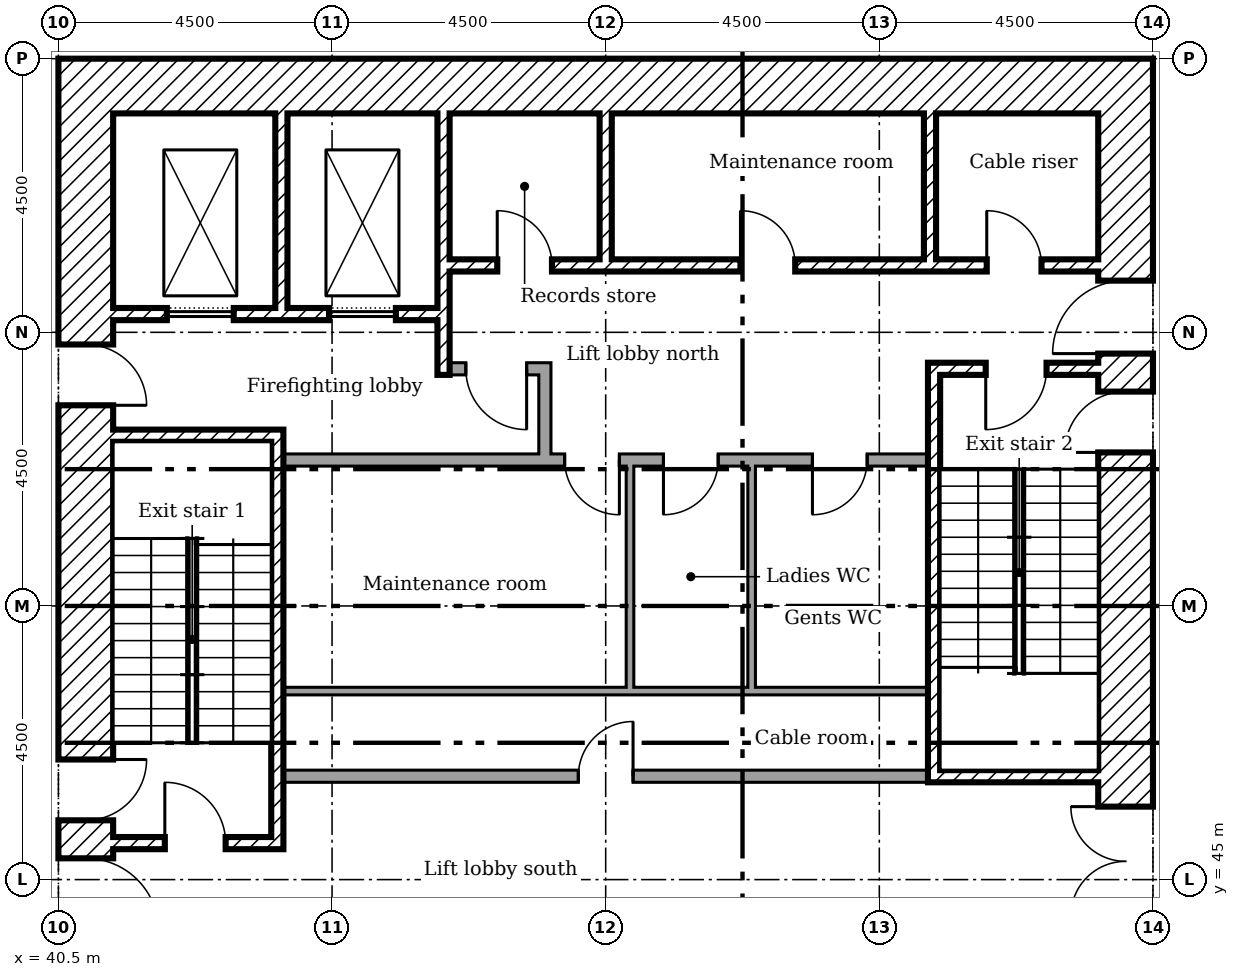
"""IFC4 building model, lengths in metres.
Left out: names, types, materials, properties, quantities, classifications, styles, units other than length and angle.
Written with IfcOpenShell. Run it as: python <this file> out.ifc"""

import sys

from ifc_helpers import new_model, si_unit, direction, frame, frame_2d, origin, place, context, subcontext, project, spatial, rectangle, extrude, element, fill, save


model = new_model("IFC4")
c1 = context("Model", 3, precision=1e-05, world=origin(), true_north=direction((0.0, 1.0)))
c2 = subcontext(c1, "Body", "Model", "MODEL_VIEW")
j1 = project(units=[si_unit("LENGTHUNIT", "METRE"), si_unit("PLANEANGLEUNIT", "RADIAN")], contexts=[c1])
p1 = place(None, origin())
s1 = spatial("IfcSite", under=j1, at=p1, CompositionType="ELEMENT")
p2 = place(p1, origin())
s2 = spatial("IfcBuilding", under=s1, at=p2, CompositionType="ELEMENT")
p3 = place(p2, frame((0.0, 0.0, 34.2)))
s3 = spatial("IfcBuildingStorey", under=s2, at=p3, CompositionType="ELEMENT", Elevation=34.2)
p4 = place(p3, frame((58.05, 40.5, 0.0), z_axis=(0.0, 0.0, 1.0), x_axis=(0.0, 1.0, 0.0)))
e1 = element("IfcWall", 1, at=p4, inside=s3, PredefinedType="SHEAR", context=c2, shape_type="SweptSolid", body=[
    extrude(rectangle(XDim=18.0, YDim=0.9, at=frame_2d((9.0, 0.0))), origin(), (0.0, 0.0, 1.0), 4.125),
])
p5 = place(p4, frame((13.15, 0.0, 0.0)))
e2 = element("IfcOpeningElement", 2, at=p5, cuts=e1, PredefinedType="OPENING", context=c2, shape_type="SweptSolid", body=[
    extrude(rectangle(XDim=1.2, YDim=2.1, at=frame_2d((0.6, 1.05))), frame((0.0, 0.46, 0.0), z_axis=(0.0, -1.0, 0.0), x_axis=(1.0, 0.0, 0.0)), (0.0, 0.0, 1.0), 0.92),
])
p6 = place(p4, frame((3.9, 0.0, 0.0)))
e3 = element("IfcOpeningElement", 3, at=p6, cuts=e1, PredefinedType="OPENING", context=c2, shape_type="SweptSolid", body=[
    extrude(rectangle(XDim=1.8, YDim=2.1, at=frame_2d((0.9, 1.05))), frame((0.0, 0.46, 0.0), z_axis=(0.0, -1.0, 0.0), x_axis=(1.0, 0.0, 0.0)), (0.0, 0.0, 1.0), 0.92),
])
p7 = place(p4, frame((11.525, 0.0, 0.0)))
e4 = element("IfcOpeningElement", 4, at=p7, cuts=e1, PredefinedType="OPENING", context=c2, shape_type="SweptSolid", body=[
    extrude(rectangle(XDim=1.0, YDim=2.1, at=frame_2d((0.5, 1.05))), frame((0.0, 0.46, 0.0), z_axis=(0.0, -1.0, 0.0), x_axis=(1.0, 0.0, 0.0)), (0.0, 0.0, 1.0), 0.92),
])
p8 = place(p3, frame((41.4, 58.05, 0.0)))
e5 = element("IfcWall", 5, at=p8, inside=s3, PredefinedType="SHEAR", context=c2, shape_type="SweptSolid", body=[
    extrude(rectangle(XDim=16.2, YDim=0.9, at=frame_2d((8.1, 0.0))), origin(), (0.0, 0.0, 1.0), 4.125),
])
p9 = place(p3, frame((40.95, 40.5, 0.0), z_axis=(0.0, 0.0, 1.0), x_axis=(0.0, 1.0, 0.0)))
e6 = element("IfcWall", 6, at=p9, inside=s3, PredefinedType="SHEAR", context=c2, shape_type="SweptSolid", body=[
    extrude(rectangle(XDim=18.0, YDim=0.9, at=frame_2d((9.0, 0.0))), origin(), (0.0, 0.0, 1.0), 4.125),
])
p10 = place(p9, frame((3.65, 0.0, 0.0)))
e7 = element("IfcOpeningElement", 7, at=p10, cuts=e6, PredefinedType="OPENING", context=c2, shape_type="SweptSolid", body=[
    extrude(rectangle(XDim=1.2, YDim=2.1, at=frame_2d((0.6, 1.05))), frame((0.0, 0.46, 0.0), z_axis=(0.0, -1.0, 0.0), x_axis=(1.0, 0.0, 0.0)), (0.0, 0.0, 1.0), 0.92),
])
p11 = place(p9, frame((5.475, 0.0, 0.0)))
e8 = element("IfcOpeningElement", 8, at=p11, cuts=e6, PredefinedType="OPENING", context=c2, shape_type="SweptSolid", body=[
    extrude(rectangle(XDim=1.0, YDim=2.1, at=frame_2d((0.5, 1.05))), frame((0.0, 0.46, 0.0), z_axis=(0.0, -1.0, 0.0), x_axis=(1.0, 0.0, 0.0)), (0.0, 0.0, 1.0), 0.92),
])
p12 = place(p9, frame((12.3, 0.0, 0.0)))
e9 = element("IfcOpeningElement", 9, at=p12, cuts=e6, PredefinedType="OPENING", context=c2, shape_type="SweptSolid", body=[
    extrude(rectangle(XDim=1.0, YDim=2.1, at=frame_2d((0.5, 1.05))), frame((0.0, 0.46, 0.0), z_axis=(0.0, -1.0, 0.0), x_axis=(1.0, 0.0, 0.0)), (0.0, 0.0, 1.0), 0.92),
])
p13 = place(p3, frame((44.167, 57.6, 0.0), z_axis=(0.0, 0.0, 1.0), x_axis=(0.0, -1.0, 0.0)))
e10 = element("IfcWall", 10, at=p13, inside=s3, PredefinedType="SHEAR", context=c2, shape_type="SweptSolid", body=[
    extrude(rectangle(XDim=3.2, YDim=0.2, at=frame_2d((1.6, 0.0))), origin(), (0.0, 0.0, 1.0), 4.125),
])
p14 = place(p3, frame((46.833, 57.6, 0.0), z_axis=(0.0, 0.0, 1.0), x_axis=(0.0, -1.0, 0.0)))
e11 = element("IfcWall", 11, at=p14, inside=s3, PredefinedType="SHEAR", context=c2, shape_type="SweptSolid", body=[
    extrude(rectangle(XDim=4.3, YDim=0.2, at=frame_2d((2.15, 0.0))), origin(), (0.0, 0.0, 1.0), 4.125),
])
for number, where, z_axis, x_axis in (
    (12, (49.5, 57.6, 0.0), (0.0, 0.0, 1.0), (0.0, -1.0, 0.0)),
    (13, (54.833, 57.6, 0.0), (0.0, 0.0, 1.0), (0.0, -1.0, 0.0)),
):
    element("IfcWall", number, at=place(p3, frame(where, z_axis=z_axis, x_axis=x_axis)), inside=s3, PredefinedType="SHEAR", context=c2, shape_type="SweptSolid", body=[
        extrude(rectangle(XDim=2.4, YDim=0.2, at=frame_2d((1.2, 0.0))), origin(), (0.0, 0.0, 1.0), 4.125),
    ])
p15 = place(p3, frame((48.5, 51.9, 0.0), z_axis=(0.0, 0.0, 1.0), x_axis=(0.0, 1.0, 0.0)))
e14 = element("IfcWall", 14, at=p15, inside=s3, PredefinedType="PARTITIONING", context=c2, shape_type="SweptSolid", body=[
    extrude(rectangle(XDim=1.6, YDim=0.2, at=frame_2d((0.8, 0.0))), origin(), (0.0, 0.0, 1.0), 4.125),
])
p16 = place(p3, frame((46.933, 53.4, 0.0)))
e15 = element("IfcWall", 15, at=p16, inside=s3, PredefinedType="PARTITIONING", context=c2, shape_type="SweptSolid", body=[
    extrude(rectangle(XDim=1.467, YDim=0.2, at=frame_2d((0.733, 0.0))), origin(), (0.0, 0.0, 1.0), 4.125),
])
p17 = place(p16, frame((0.267, 0.0, 0.0)))
e16 = element("IfcOpeningElement", 16, at=p17, cuts=e15, PredefinedType="OPENING", context=c2, shape_type="SweptSolid", body=[
    extrude(rectangle(XDim=1.0, YDim=2.1, at=frame_2d((0.5, 1.05))), frame((0.0, 0.11, 0.0), z_axis=(0.0, -1.0, 0.0), x_axis=(1.0, 0.0, 0.0)), (0.0, 0.0, 1.0), 0.22),
])
p18 = place(p3, frame((46.933, 55.1, 0.0)))
e17 = element("IfcWall", 17, at=p18, inside=s3, PredefinedType="SHEAR", context=c2, shape_type="SweptSolid", body=[
    extrude(rectangle(XDim=10.667, YDim=0.2, at=frame_2d((5.333, 0.0))), origin(), (0.0, 0.0, 1.0), 4.125),
])
p19 = place(p18, frame((8.833, 0.0, 0.0)))
e18 = element("IfcOpeningElement", 18, at=p19, cuts=e17, PredefinedType="OPENING", context=c2, shape_type="SweptSolid", body=[
    extrude(rectangle(XDim=0.9, YDim=2.1, at=frame_2d((0.45, 1.05))), frame((0.0, 0.11, 0.0), z_axis=(0.0, -1.0, 0.0), x_axis=(1.0, 0.0, 0.0)), (0.0, 0.0, 1.0), 0.22),
])
p20 = place(p18, frame((0.783, 0.0, 0.0)))
e19 = element("IfcOpeningElement", 19, at=p20, cuts=e17, PredefinedType="OPENING", context=c2, shape_type="SweptSolid", body=[
    extrude(rectangle(XDim=0.9, YDim=2.1, at=frame_2d((0.45, 1.05))), frame((0.0, 0.11, 0.0), z_axis=(0.0, -1.0, 0.0), x_axis=(1.0, 0.0, 0.0)), (0.0, 0.0, 1.0), 0.22),
])
p21 = place(p18, frame((4.783, 0.0, 0.0)))
e20 = element("IfcOpeningElement", 20, at=p21, cuts=e17, PredefinedType="OPENING", context=c2, shape_type="SweptSolid", body=[
    extrude(rectangle(XDim=0.9, YDim=2.1, at=frame_2d((0.45, 1.05))), frame((0.0, 0.11, 0.0), z_axis=(0.0, -1.0, 0.0), x_axis=(1.0, 0.0, 0.0)), (0.0, 0.0, 1.0), 0.22),
])
p22 = place(p3, frame((41.4, 54.3, 0.0)))
e21 = element("IfcWall", 21, at=p22, inside=s3, PredefinedType="SHEAR", context=c2, shape_type="SweptSolid", body=[
    extrude(rectangle(XDim=5.333, YDim=0.2, at=frame_2d((2.667, 0.0))), origin(), (0.0, 0.0, 1.0), 4.125),
])
p23 = place(p22, frame((0.883, 0.0, 0.0)))
e22 = element("IfcOpeningElement", 22, at=p23, cuts=e21, PredefinedType="OPENING", context=c2, shape_type="SweptSolid", body=[
    extrude(rectangle(XDim=1.1, YDim=2.1, at=frame_2d((0.55, 1.05))), frame((0.0, 0.11, 0.0), z_axis=(0.0, -1.0, 0.0), x_axis=(1.0, 0.0, 0.0)), (0.0, 0.0, 1.0), 0.22),
])
p24 = place(p22, frame((3.55, 0.0, 0.0)))
e23 = element("IfcOpeningElement", 23, at=p24, cuts=e21, PredefinedType="OPENING", context=c2, shape_type="SweptSolid", body=[
    extrude(rectangle(XDim=1.1, YDim=2.1, at=frame_2d((0.55, 1.05))), frame((0.0, 0.11, 0.0), z_axis=(0.0, -1.0, 0.0), x_axis=(1.0, 0.0, 0.0)), (0.0, 0.0, 1.0), 0.22),
])
p25 = place(p3, frame((44.1, 45.5, 0.0), z_axis=(0.0, 0.0, 1.0), x_axis=(0.0, 1.0, 0.0)))
e24 = element("IfcWall", 24, at=p25, inside=s3, PredefinedType="SHEAR", context=c2, shape_type="SweptSolid", body=[
    extrude(rectangle(XDim=6.9, YDim=0.2, at=frame_2d((3.45, 0.0))), origin(), (0.0, 0.0, 1.0), 4.125),
])
p26 = place(p3, frame((41.4, 52.3, 0.0)))
e25 = element("IfcWall", 25, at=p26, inside=s3, PredefinedType="SHEAR", context=c2, shape_type="SweptSolid", body=[
    extrude(rectangle(XDim=2.6, YDim=0.2, at=frame_2d((1.3, 0.0))), origin(), (0.0, 0.0, 1.0), 4.125),
])
p27 = place(p3, frame((41.4, 45.6, 0.0)))
e26 = element("IfcWall", 26, at=p27, inside=s3, PredefinedType="SHEAR", context=c2, shape_type="SweptSolid", body=[
    extrude(rectangle(XDim=2.6, YDim=0.2, at=frame_2d((1.3, 0.0))), origin(), (0.0, 0.0, 1.0), 4.125),
])
p28 = place(p27, frame((0.85, 0.0, 0.0)))
e27 = element("IfcOpeningElement", 27, at=p28, cuts=e26, PredefinedType="OPENING", context=c2, shape_type="SweptSolid", body=[
    extrude(rectangle(XDim=1.0, YDim=2.1, at=frame_2d((0.5, 1.05))), frame((0.0, 0.11, 0.0), z_axis=(0.0, -1.0, 0.0), x_axis=(1.0, 0.0, 0.0)), (0.0, 0.0, 1.0), 0.22),
])
p29 = place(p3, frame((54.8, 53.4, 0.0)))
e28 = element("IfcWall", 28, at=p29, inside=s3, PredefinedType="SHEAR", context=c2, shape_type="SweptSolid", body=[
    extrude(rectangle(XDim=2.8, YDim=0.2, at=frame_2d((1.4, 0.0))), origin(), (0.0, 0.0, 1.0), 4.125),
])
p30 = place(p29, frame((0.95, 0.0, 0.0)))
e29 = element("IfcOpeningElement", 29, at=p30, cuts=e28, PredefinedType="OPENING", context=c2, shape_type="SweptSolid", body=[
    extrude(rectangle(XDim=1.0, YDim=2.1, at=frame_2d((0.5, 1.05))), frame((0.0, 0.11, 0.0), z_axis=(0.0, -1.0, 0.0), x_axis=(1.0, 0.0, 0.0)), (0.0, 0.0, 1.0), 0.22),
])
p31 = place(p3, frame((54.8, 46.7, 0.0)))
e30 = element("IfcWall", 30, at=p31, inside=s3, PredefinedType="SHEAR", context=c2, shape_type="SweptSolid", body=[
    extrude(rectangle(XDim=2.8, YDim=0.2, at=frame_2d((1.4, 0.0))), origin(), (0.0, 0.0, 1.0), 4.125),
])
p32 = place(p3, frame((54.9, 46.8, 0.0), z_axis=(0.0, 0.0, 1.0), x_axis=(0.0, 1.0, 0.0)))
e31 = element("IfcWall", 31, at=p32, inside=s3, PredefinedType="SHEAR", context=c2, shape_type="SweptSolid", body=[
    extrude(rectangle(XDim=6.5, YDim=0.2, at=frame_2d((3.25, 0.0))), origin(), (0.0, 0.0, 1.0), 4.125),
])
p33 = place(p3, frame((44.2, 51.9, 0.0)))
e32 = element("IfcWall", 32, at=p33, inside=s3, PredefinedType="PARTITIONING", context=c2, shape_type="SweptSolid", body=[
    extrude(rectangle(XDim=10.6, YDim=0.2, at=frame_2d((5.3, 0.0))), origin(), (0.0, 0.0, 1.0), 4.125),
])
p34 = place(p33, frame((4.625, 0.0, 0.0)))
e33 = element("IfcOpeningElement", 33, at=p34, cuts=e32, PredefinedType="OPENING", context=c2, shape_type="SweptSolid", body=[
    extrude(rectangle(XDim=0.9, YDim=2.1, at=frame_2d((0.45, 1.05))), frame((0.0, 0.11, 0.0), z_axis=(0.0, -1.0, 0.0), x_axis=(1.0, 0.0, 0.0)), (0.0, 0.0, 1.0), 0.22),
])
p35 = place(p33, frame((6.25, 0.0, 0.0)))
e34 = element("IfcOpeningElement", 34, at=p35, cuts=e32, PredefinedType="OPENING", context=c2, shape_type="SweptSolid", body=[
    extrude(rectangle(XDim=0.9, YDim=2.1, at=frame_2d((0.45, 1.05))), frame((0.0, 0.11, 0.0), z_axis=(0.0, -1.0, 0.0), x_axis=(1.0, 0.0, 0.0)), (0.0, 0.0, 1.0), 0.22),
])
p36 = place(p33, frame((8.7, 0.0, 0.0)))
e35 = element("IfcOpeningElement", 35, at=p36, cuts=e32, PredefinedType="OPENING", context=c2, shape_type="SweptSolid", body=[
    extrude(rectangle(XDim=0.9, YDim=2.1, at=frame_2d((0.45, 1.05))), frame((0.0, 0.11, 0.0), z_axis=(0.0, -1.0, 0.0), x_axis=(1.0, 0.0, 0.0)), (0.0, 0.0, 1.0), 0.22),
])
p37 = place(p3, frame((44.2, 46.7, 0.0)))
e36 = element("IfcWall", 36, at=p37, inside=s3, PredefinedType="PARTITIONING", context=c2, shape_type="SweptSolid", body=[
    extrude(rectangle(XDim=10.6, YDim=0.2, at=frame_2d((5.3, 0.0))), origin(), (0.0, 0.0, 1.0), 4.125),
])
p38 = place(p37, frame((4.85, 0.0, 0.0)))
e37 = element("IfcOpeningElement", 37, at=p38, cuts=e36, PredefinedType="OPENING", context=c2, shape_type="SweptSolid", body=[
    extrude(rectangle(XDim=0.9, YDim=2.1, at=frame_2d((0.45, 1.05))), frame((0.0, 0.11, 0.0), z_axis=(0.0, -1.0, 0.0), x_axis=(1.0, 0.0, 0.0)), (0.0, 0.0, 1.0), 0.22),
])
p39 = place(p3, frame((49.962, 48.1, 0.0), z_axis=(0.0, 0.0, 1.0), x_axis=(-1.0, 0.0, 0.0)))
e38 = element("IfcWall", 38, at=p39, inside=s3, PredefinedType="PARTITIONING", context=c2, shape_type="SweptSolid", body=[
    extrude(rectangle(XDim=5.762, YDim=0.125, at=frame_2d((2.881, 0.0))), origin(), (0.0, 0.0, 1.0), 4.125),
])
p40 = place(p3, frame((51.962, 48.1, 0.0), z_axis=(0.0, 0.0, 1.0), x_axis=(-1.0, 0.0, 0.0)))
e39 = element("IfcWall", 39, at=p40, inside=s3, PredefinedType="PARTITIONING", context=c2, shape_type="SweptSolid", body=[
    extrude(rectangle(XDim=2.062, YDim=0.125, at=frame_2d((1.031, 0.0))), origin(), (0.0, 0.0, 1.0), 4.125),
])
p41 = place(p3, frame((49.9, 48.163, 0.0), z_axis=(0.0, 0.0, 1.0), x_axis=(0.0, 1.0, 0.0)))
e40 = element("IfcWall", 40, at=p41, inside=s3, PredefinedType="PARTITIONING", context=c2, shape_type="SweptSolid", body=[
    extrude(rectangle(XDim=3.637, YDim=0.125, at=frame_2d((1.819, 0.0))), origin(), (0.0, 0.0, 1.0), 4.125),
])
p42 = place(p3, frame((54.8, 48.1, 0.0), z_axis=(0.0, 0.0, 1.0), x_axis=(-1.0, 0.0, 0.0)))
e41 = element("IfcWall", 41, at=p42, inside=s3, PredefinedType="PARTITIONING", context=c2, shape_type="SweptSolid", body=[
    extrude(rectangle(XDim=2.9, YDim=0.125, at=frame_2d((1.45, 0.0))), origin(), (0.0, 0.0, 1.0), 4.125),
])
p43 = place(p3, frame((51.9, 48.163, 0.0), z_axis=(0.0, 0.0, 1.0), x_axis=(0.0, 1.0, 0.0)))
e42 = element("IfcWall", 42, at=p43, inside=s3, PredefinedType="PARTITIONING", context=c2, shape_type="SweptSolid", body=[
    extrude(rectangle(XDim=3.637, YDim=0.125, at=frame_2d((1.819, 0.0))), origin(), (0.0, 0.0, 1.0), 4.125),
])
p44 = place(p5, origin())
e43 = element("IfcDoor", 43, at=p44, inside=s3, OperationType="SINGLE_SWING_RIGHT", PredefinedType="DOOR", context=c2, shape_type="SweptSolid", body=[
    extrude(rectangle(XDim=1.2, YDim=2.1, at=frame_2d((0.6, 1.05))), frame((0.0, 0.025, 0.0), z_axis=(0.0, -1.0, 0.0), x_axis=(1.0, 0.0, 0.0)), (0.0, 0.0, 1.0), 0.05),
])
fill(e2, e43)
p45 = place(p6, origin())
e44 = element("IfcDoor", 44, at=p45, inside=s3, OperationType="DOUBLE_DOOR_SINGLE_SWING", PredefinedType="DOOR", context=c2, shape_type="SweptSolid", body=[
    extrude(rectangle(XDim=1.8, YDim=2.1, at=frame_2d((0.9, 1.05))), frame((0.0, 0.025, 0.0), z_axis=(0.0, -1.0, 0.0), x_axis=(1.0, 0.0, 0.0)), (0.0, 0.0, 1.0), 0.05),
])
fill(e3, e44)
p46 = place(p10, frame((1.2, 0.0, 0.0), x_axis=(-1.0, 0.0, 0.0)))
e45 = element("IfcDoor", 45, at=p46, inside=s3, OperationType="SINGLE_SWING_LEFT", PredefinedType="DOOR", context=c2, shape_type="SweptSolid", body=[
    extrude(rectangle(XDim=1.2, YDim=2.1, at=frame_2d((0.6, 1.05))), frame((0.0, 0.025, 0.0), z_axis=(0.0, -1.0, 0.0), x_axis=(1.0, 0.0, 0.0)), (0.0, 0.0, 1.0), 0.05),
])
fill(e7, e45)
p47 = place(p28, origin())
e46 = element("IfcDoor", 46, at=p47, inside=s3, OperationType="SINGLE_SWING_RIGHT", PredefinedType="DOOR", context=c2, shape_type="SweptSolid", body=[
    extrude(rectangle(XDim=1.0, YDim=2.1, at=frame_2d((0.5, 1.05))), frame((0.0, 0.025, 0.0), z_axis=(0.0, -1.0, 0.0), x_axis=(1.0, 0.0, 0.0)), (0.0, 0.0, 1.0), 0.05),
])
fill(e27, e46)
p48 = place(p11, frame((1.0, 0.0, 0.0), x_axis=(-1.0, 0.0, 0.0)))
e47 = element("IfcDoor", 47, at=p48, inside=s3, OperationType="SINGLE_SWING_RIGHT", PredefinedType="DOOR", context=c2, shape_type="SweptSolid", body=[
    extrude(rectangle(XDim=1.0, YDim=2.1, at=frame_2d((0.5, 1.05))), frame((0.0, 0.025, 0.0), z_axis=(0.0, -1.0, 0.0), x_axis=(1.0, 0.0, 0.0)), (0.0, 0.0, 1.0), 0.05),
])
fill(e8, e47)
p49 = place(p30, frame((1.0, 0.0, 0.0), x_axis=(-1.0, 0.0, 0.0)))
e48 = element("IfcDoor", 48, at=p49, inside=s3, OperationType="SINGLE_SWING_LEFT", PredefinedType="DOOR", context=c2, shape_type="SweptSolid", body=[
    extrude(rectangle(XDim=1.0, YDim=2.1, at=frame_2d((0.5, 1.05))), frame((0.0, 0.025, 0.0), z_axis=(0.0, -1.0, 0.0), x_axis=(1.0, 0.0, 0.0)), (0.0, 0.0, 1.0), 0.05),
])
fill(e29, e48)
p50 = place(p7, origin())
e49 = element("IfcDoor", 49, at=p50, inside=s3, OperationType="SINGLE_SWING_RIGHT", PredefinedType="DOOR", context=c2, shape_type="SweptSolid", body=[
    extrude(rectangle(XDim=1.0, YDim=2.1, at=frame_2d((0.5, 1.05))), frame((0.0, 0.025, 0.0), z_axis=(0.0, -1.0, 0.0), x_axis=(1.0, 0.0, 0.0)), (0.0, 0.0, 1.0), 0.05),
])
fill(e4, e49)
p51 = place(p17, frame((1.0, 0.0, 0.0), x_axis=(-1.0, 0.0, 0.0)))
e50 = element("IfcDoor", 50, at=p51, inside=s3, OperationType="SINGLE_SWING_RIGHT", PredefinedType="DOOR", context=c2, shape_type="SweptSolid", body=[
    extrude(rectangle(XDim=1.0, YDim=2.1, at=frame_2d((0.5, 1.05))), frame((0.0, 0.025, 0.0), z_axis=(0.0, -1.0, 0.0), x_axis=(1.0, 0.0, 0.0)), (0.0, 0.0, 1.0), 0.05),
])
fill(e16, e50)
p52 = place(p12, frame((1.0, 0.0, 0.0), x_axis=(-1.0, 0.0, 0.0)))
e51 = element("IfcDoor", 51, at=p52, inside=s3, OperationType="SINGLE_SWING_LEFT", PredefinedType="DOOR", context=c2, shape_type="SweptSolid", body=[
    extrude(rectangle(XDim=1.0, YDim=2.1, at=frame_2d((0.5, 1.05))), frame((0.0, 0.025, 0.0), z_axis=(0.0, -1.0, 0.0), x_axis=(1.0, 0.0, 0.0)), (0.0, 0.0, 1.0), 0.05),
])
fill(e9, e51)
p53 = place(p19, origin())
e52 = element("IfcDoor", 52, at=p53, inside=s3, OperationType="SINGLE_SWING_RIGHT", PredefinedType="DOOR", context=c2, shape_type="SweptSolid", body=[
    extrude(rectangle(XDim=0.9, YDim=2.1, at=frame_2d((0.45, 1.05))), frame((0.0, 0.025, 0.0), z_axis=(0.0, -1.0, 0.0), x_axis=(1.0, 0.0, 0.0)), (0.0, 0.0, 1.0), 0.05),
])
fill(e18, e52)
p54 = place(p20, origin())
e53 = element("IfcDoor", 53, at=p54, inside=s3, OperationType="SINGLE_SWING_RIGHT", PredefinedType="DOOR", context=c2, shape_type="SweptSolid", body=[
    extrude(rectangle(XDim=0.9, YDim=2.1, at=frame_2d((0.45, 1.05))), frame((0.0, 0.025, 0.0), z_axis=(0.0, -1.0, 0.0), x_axis=(1.0, 0.0, 0.0)), (0.0, 0.0, 1.0), 0.05),
])
fill(e19, e53)
p55 = place(p21, origin())
e54 = element("IfcDoor", 54, at=p55, inside=s3, OperationType="SINGLE_SWING_RIGHT", PredefinedType="DOOR", context=c2, shape_type="SweptSolid", body=[
    extrude(rectangle(XDim=0.9, YDim=2.1, at=frame_2d((0.45, 1.05))), frame((0.0, 0.025, 0.0), z_axis=(0.0, -1.0, 0.0), x_axis=(1.0, 0.0, 0.0)), (0.0, 0.0, 1.0), 0.05),
])
fill(e20, e54)
p56 = place(p38, origin())
e55 = element("IfcDoor", 55, at=p56, inside=s3, OperationType="SINGLE_SWING_LEFT", PredefinedType="DOOR", context=c2, shape_type="SweptSolid", body=[
    extrude(rectangle(XDim=0.9, YDim=2.1, at=frame_2d((0.45, 1.05))), frame((0.0, 0.025, 0.0), z_axis=(0.0, -1.0, 0.0), x_axis=(1.0, 0.0, 0.0)), (0.0, 0.0, 1.0), 0.05),
])
fill(e37, e55)
p57 = place(p34, frame((0.9, 0.0, 0.0), x_axis=(-1.0, 0.0, 0.0)))
e56 = element("IfcDoor", 56, at=p57, inside=s3, OperationType="SINGLE_SWING_RIGHT", PredefinedType="DOOR", context=c2, shape_type="SweptSolid", body=[
    extrude(rectangle(XDim=0.9, YDim=2.1, at=frame_2d((0.45, 1.05))), frame((0.0, 0.025, 0.0), z_axis=(0.0, -1.0, 0.0), x_axis=(1.0, 0.0, 0.0)), (0.0, 0.0, 1.0), 0.05),
])
fill(e33, e56)
p58 = place(p35, frame((0.9, 0.0, 0.0), x_axis=(-1.0, 0.0, 0.0)))
e57 = element("IfcDoor", 57, at=p58, inside=s3, OperationType="SINGLE_SWING_LEFT", PredefinedType="DOOR", context=c2, shape_type="SweptSolid", body=[
    extrude(rectangle(XDim=0.9, YDim=2.1, at=frame_2d((0.45, 1.05))), frame((0.0, 0.025, 0.0), z_axis=(0.0, -1.0, 0.0), x_axis=(1.0, 0.0, 0.0)), (0.0, 0.0, 1.0), 0.05),
])
fill(e34, e57)
p59 = place(p36, frame((0.9, 0.0, 0.0), x_axis=(-1.0, 0.0, 0.0)))
e58 = element("IfcDoor", 58, at=p59, inside=s3, OperationType="SINGLE_SWING_LEFT", PredefinedType="DOOR", context=c2, shape_type="SweptSolid", body=[
    extrude(rectangle(XDim=0.9, YDim=2.1, at=frame_2d((0.45, 1.05))), frame((0.0, 0.025, 0.0), z_axis=(0.0, -1.0, 0.0), x_axis=(1.0, 0.0, 0.0)), (0.0, 0.0, 1.0), 0.05),
])
fill(e35, e58)
p60 = place(p23, origin())
e59 = element("IfcDoor", 59, at=p60, inside=s3, OperationType="SLIDING_TO_LEFT", PredefinedType="DOOR", context=c2, shape_type="SweptSolid", body=[
    extrude(rectangle(XDim=1.1, YDim=2.1, at=frame_2d((0.55, 1.05))), frame((0.0, 0.025, 0.0), z_axis=(0.0, -1.0, 0.0), x_axis=(1.0, 0.0, 0.0)), (0.0, 0.0, 1.0), 0.05),
])
fill(e22, e59)
p61 = place(p24, origin())
e60 = element("IfcDoor", 60, at=p61, inside=s3, OperationType="SLIDING_TO_LEFT", PredefinedType="DOOR", context=c2, shape_type="SweptSolid", body=[
    extrude(rectangle(XDim=1.1, YDim=2.1, at=frame_2d((0.55, 1.05))), frame((0.0, 0.025, 0.0), z_axis=(0.0, -1.0, 0.0), x_axis=(1.0, 0.0, 0.0)), (0.0, 0.0, 1.0), 0.05),
])
fill(e23, e60)
save(model, sys.argv[1])
